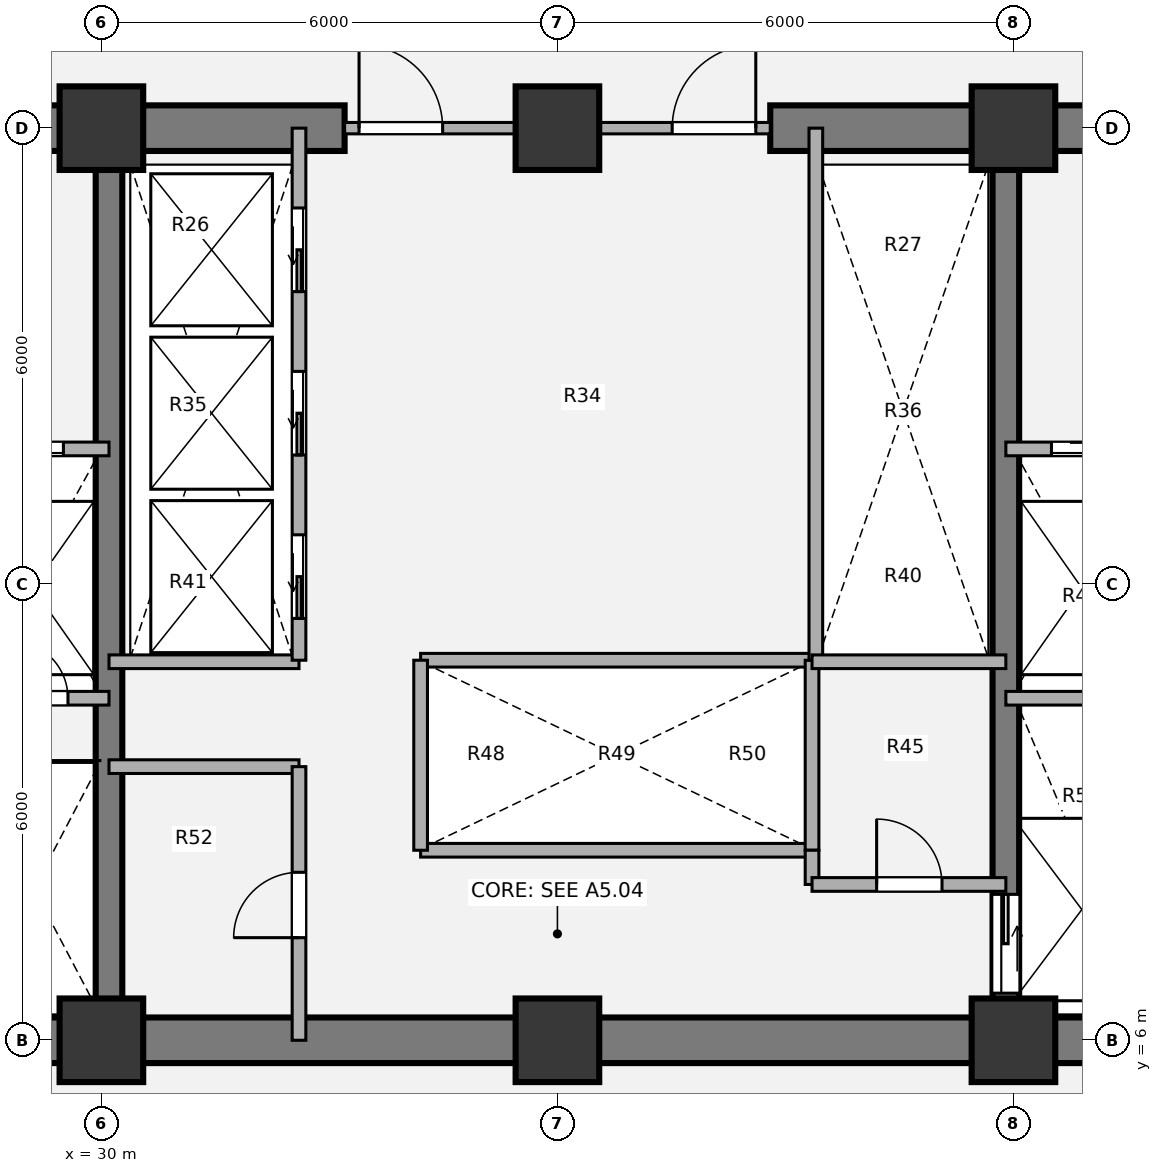
"""IFC4 building model, lengths in metres.
Left out: names, types, materials, properties, quantities, classifications, styles, units other than length and angle.
Written with IfcOpenShell. Run it as: python <this file> out.ifc"""

import sys

from ifc_helpers import new_model, si_unit, direction, frame, frame_2d, origin, origin_2d, place, context, subcontext, project, spatial, rectangle, extrude, source, transform, mapped, element, fill, save


model = new_model("IFC4")
c1 = context("Model", 3, precision=1e-05, world=origin(), true_north=direction((0.0, 1.0)))
c2 = subcontext(c1, "Body", "Model", "MODEL_VIEW")
j1 = project(units=[si_unit("LENGTHUNIT", "METRE"), si_unit("PLANEANGLEUNIT", "RADIAN")], contexts=[c1])
p1 = place(None, origin())
s1 = spatial("IfcSite", under=j1, at=p1, CompositionType="ELEMENT")
p2 = place(p1, origin())
s2 = spatial("IfcBuilding", under=s1, at=p2, CompositionType="ELEMENT")
p3 = place(p2, frame((0.0, 0.0, 34.56)))
s3 = spatial("IfcBuildingStorey", under=s2, at=p3, CompositionType="ELEMENT", Elevation=34.56)
m1 = source(origin(), c2, "Body", "SweptSolid", [
    extrude(rectangle(XDim=1.1, YDim=1.1, at=origin_2d()), origin(), (0.0, 0.0, 1.0), 3.78),
])
for number, where, z_axis, x_axis in (
    (1, (30.0, 6.0, 0.0), (0.0, 0.0, 1.0), (1.0, 0.0, 0.0)),
    (2, (36.0, 6.0, 0.0), (0.0, 0.0, 1.0), (1.0, 0.0, 0.0)),
    (3, (42.0, 6.0, 0.0), (0.0, 0.0, 1.0), (1.0, 0.0, 0.0)),
    (4, (30.0, 18.0, 0.0), (0.0, 0.0, 1.0), (1.0, 0.0, 0.0)),
    (5, (36.0, 18.0, 0.0), (0.0, 0.0, 1.0), (1.0, 0.0, 0.0)),
    (6, (42.0, 18.0, 0.0), (0.0, 0.0, 1.0), (1.0, 0.0, 0.0)),
):
    element("IfcColumn", number, at=place(p3, frame(where, z_axis=z_axis, x_axis=x_axis)), inside=s3, PredefinedType="COLUMN", context=c2, shape_type="MappedRepresentation", body=[
        mapped(m1, transform((0.0, 0.0, 0.0), x_axis=(1.0, 0.0, 0.0), y_axis=(0.0, 1.0, 0.0), z_axis=(0.0, 0.0, 1.0), scale=1.0)),
    ])
p4 = place(p3, frame((48.3, 6.0, 0.0), z_axis=(0.0, 0.0, 1.0), x_axis=(-1.0, 0.0, 0.0)))
e7 = element("IfcWall", 7, at=p4, inside=s3, PredefinedType="SHEAR", context=c2, shape_type="SweptSolid", body=[
    extrude(rectangle(XDim=24.6, YDim=0.6, at=frame_2d((12.3, 0.0))), origin(), (0.0, 0.0, 1.0), 3.78),
])
p5 = place(p3, frame((23.7, 18.0, 0.0), z_axis=(0.0, 0.0, 1.0), x_axis=(1.0, 0.0, 0.0)))
e8 = element("IfcWall", 8, at=p5, inside=s3, PredefinedType="SHEAR", context=c2, shape_type="SweptSolid", body=[
    extrude(rectangle(XDim=9.5, YDim=0.6, at=frame_2d((4.75, 0.0))), origin(), (0.0, 0.0, 1.0), 3.78),
])
p6 = place(p5, frame((2.95, 0.0, 0.0)))
e9 = element("IfcOpeningElement", 9, at=p6, cuts=e8, PredefinedType="OPENING", context=c2, shape_type="SweptSolid", body=[
    extrude(rectangle(XDim=1.1, YDim=2.1, at=origin_2d()), frame((0.55, 0.31, 1.05), z_axis=(0.0, -1.0, 0.0), x_axis=(1.0, 0.0, 0.0)), (0.0, 0.0, 1.0), 0.62),
])
p7 = place(p3, frame((38.8, 18.0, 0.0), z_axis=(0.0, 0.0, 1.0), x_axis=(1.0, 0.0, 0.0)))
e10 = element("IfcWall", 10, at=p7, inside=s3, PredefinedType="SHEAR", context=c2, shape_type="SweptSolid", body=[
    extrude(rectangle(XDim=9.5, YDim=0.6, at=frame_2d((4.75, 0.0))), origin(), (0.0, 0.0, 1.0), 3.78),
])
p8 = place(p7, frame((5.45, 0.0, 0.0)))
e11 = element("IfcOpeningElement", 11, at=p8, cuts=e10, PredefinedType="OPENING", context=c2, shape_type="SweptSolid", body=[
    extrude(rectangle(XDim=1.1, YDim=2.1, at=origin_2d()), frame((0.55, 0.31, 1.05), z_axis=(0.0, -1.0, 0.0), x_axis=(1.0, 0.0, 0.0)), (0.0, 0.0, 1.0), 0.62),
])
p9 = place(p3, frame((30.1, 6.0, 0.0), z_axis=(0.0, 0.0, 1.0), x_axis=(0.0, 1.0, 0.0)))
e12 = element("IfcWall", 12, at=p9, inside=s3, PredefinedType="SHEAR", context=c2, shape_type="SweptSolid", body=[
    extrude(rectangle(XDim=12.0, YDim=0.35, at=frame_2d((6.0, 0.0))), origin(), (0.0, 0.0, 1.0), 3.78),
])
p10 = place(p3, frame((41.9, 18.0, 0.0), z_axis=(0.0, 0.0, 1.0), x_axis=(0.0, -1.0, 0.0)))
e13 = element("IfcWall", 13, at=p10, inside=s3, PredefinedType="SHEAR", context=c2, shape_type="SweptSolid", body=[
    extrude(rectangle(XDim=12.0, YDim=0.35, at=frame_2d((6.0, 0.0))), origin(), (0.0, 0.0, 1.0), 3.78),
])
p11 = place(p10, frame((10.08, 0.0, 0.0)))
e14 = element("IfcOpeningElement", 14, at=p11, cuts=e13, PredefinedType="OPENING", context=c2, shape_type="SweptSolid", body=[
    extrude(rectangle(XDim=1.3, YDim=2.1, at=origin_2d()), frame((0.65, 0.185, 1.05), z_axis=(0.0, -1.0, 0.0), x_axis=(1.0, 0.0, 0.0)), (0.0, 0.0, 1.0), 0.37),
])
for number, where, z_axis, x_axis in (
    (15, (34.2, 11.0, 0.0), (0.0, 0.0, 1.0), (1.0, 0.0, 0.0)),
    (16, (34.2, 8.5, 0.0), (0.0, 0.0, 1.0), (1.0, 0.0, 0.0)),
):
    element("IfcWall", number, at=place(p3, frame(where, z_axis=z_axis, x_axis=x_axis)), inside=s3, PredefinedType="PARTITIONING", context=c2, shape_type="SweptSolid", body=[
        extrude(rectangle(XDim=5.15, YDim=0.18, at=frame_2d((2.575, 0.0))), origin(), (0.0, 0.0, 1.0), 3.5),
    ])
for number, where, z_axis, x_axis in (
    (17, (34.2, 8.5, 0.0), (0.0, 0.0, 1.0), (0.0, 1.0, 0.0)),
    (18, (39.35, 8.5, 0.0), (0.0, 0.0, 1.0), (0.0, 1.0, 0.0)),
):
    element("IfcWall", number, at=place(p3, frame(where, z_axis=z_axis, x_axis=x_axis)), inside=s3, PredefinedType="PARTITIONING", context=c2, shape_type="SweptSolid", body=[
        extrude(rectangle(XDim=2.5, YDim=0.18, at=frame_2d((1.25, 0.0))), origin(), (0.0, 0.0, 1.0), 3.5),
    ])
p12 = place(p3, frame((39.4, 11.0, 0.0), z_axis=(0.0, 0.0, 1.0), x_axis=(0.0, 1.0, 0.0)))
e19 = element("IfcWall", 19, at=p12, inside=s3, PredefinedType="PARTITIONING", context=c2, shape_type="SweptSolid", body=[
    extrude(rectangle(XDim=7.0, YDim=0.18, at=frame_2d((3.5, 0.0))), origin(), (0.0, 0.0, 1.0), 3.5),
])
for number, where, z_axis, x_axis in (
    (20, (30.1, 10.98, 0.0), (0.0, 0.0, 1.0), (1.0, 0.0, 0.0)),
    (21, (30.1, 9.6, 0.0), (0.0, 0.0, 1.0), (1.0, 0.0, 0.0)),
):
    element("IfcWall", number, at=place(p3, frame(where, z_axis=z_axis, x_axis=x_axis)), inside=s3, PredefinedType="PARTITIONING", context=c2, shape_type="SweptSolid", body=[
        extrude(rectangle(XDim=2.5, YDim=0.18, at=frame_2d((1.25, 0.0))), origin(), (0.0, 0.0, 1.0), 3.5),
    ])
p13 = place(p3, frame((32.6, 6.0, 0.0), z_axis=(0.0, 0.0, 1.0), x_axis=(0.0, 1.0, 0.0)))
e22 = element("IfcWall", 22, at=p13, inside=s3, PredefinedType="PARTITIONING", context=c2, shape_type="SweptSolid", body=[
    extrude(rectangle(XDim=3.6, YDim=0.18, at=frame_2d((1.8, 0.0))), origin(), (0.0, 0.0, 1.0), 3.5),
])
p14 = place(p13, frame((1.35, 0.0, 0.0)))
e23 = element("IfcOpeningElement", 23, at=p14, cuts=e22, PredefinedType="OPENING", context=c2, shape_type="SweptSolid", body=[
    extrude(rectangle(XDim=0.86, YDim=2.1, at=origin_2d()), frame((0.43, 0.1, 1.05), z_axis=(0.0, -1.0, 0.0), x_axis=(1.0, 0.0, 0.0)), (0.0, 0.0, 1.0), 0.2),
])
p15 = place(p3, frame((39.35, 10.98, 0.0), z_axis=(0.0, 0.0, 1.0), x_axis=(1.0, 0.0, 0.0)))
e24 = element("IfcWall", 24, at=p15, inside=s3, PredefinedType="PARTITIONING", context=c2, shape_type="SweptSolid", body=[
    extrude(rectangle(XDim=2.55, YDim=0.18, at=frame_2d((1.275, 0.0))), origin(), (0.0, 0.0, 1.0), 3.5),
])
p16 = place(p3, frame((39.35, 8.05, 0.0), z_axis=(0.0, 0.0, 1.0), x_axis=(0.0, 1.0, 0.0)))
e25 = element("IfcWall", 25, at=p16, inside=s3, PredefinedType="PARTITIONING", context=c2, shape_type="SweptSolid", body=[
    extrude(rectangle(XDim=0.45, YDim=0.18, at=frame_2d((0.225, 0.0))), origin(), (0.0, 0.0, 1.0), 3.5),
])
p17 = place(p3, frame((39.35, 8.05, 0.0), z_axis=(0.0, 0.0, 1.0), x_axis=(1.0, 0.0, 0.0)))
e26 = element("IfcWall", 26, at=p17, inside=s3, PredefinedType="PARTITIONING", context=c2, shape_type="SweptSolid", body=[
    extrude(rectangle(XDim=2.55, YDim=0.18, at=frame_2d((1.275, 0.0))), origin(), (0.0, 0.0, 1.0), 3.5),
])
p18 = place(p17, frame((0.85, 0.0, 0.0)))
e27 = element("IfcOpeningElement", 27, at=p18, cuts=e26, PredefinedType="OPENING", context=c2, shape_type="SweptSolid", body=[
    extrude(rectangle(XDim=0.86, YDim=2.1, at=origin_2d()), frame((0.43, 0.1, 1.05), z_axis=(0.0, -1.0, 0.0), x_axis=(1.0, 0.0, 0.0)), (0.0, 0.0, 1.0), 0.2),
])
p19 = place(p3, frame((33.2, 18.0, 0.0), z_axis=(0.0, 0.0, 1.0), x_axis=(1.0, 0.0, 0.0)))
e28 = element("IfcWall", 28, at=p19, inside=s3, PredefinedType="PARTITIONING", context=c2, shape_type="SweptSolid", body=[
    extrude(rectangle(XDim=5.6, YDim=0.15, at=frame_2d((2.8, 0.0))), origin(), (0.0, 0.0, 1.0), 2.315),
])
p20 = place(p19, frame((0.19, 0.0, 0.0)))
e29 = element("IfcOpeningElement", 29, at=p20, cuts=e28, PredefinedType="OPENING", context=c2, shape_type="SweptSolid", body=[
    extrude(rectangle(XDim=1.1, YDim=2.1, at=origin_2d()), frame((0.55, 0.085, 1.05), z_axis=(0.0, -1.0, 0.0), x_axis=(1.0, 0.0, 0.0)), (0.0, 0.0, 1.0), 0.17),
])
p21 = place(p19, frame((4.31, 0.0, 0.0)))
e30 = element("IfcOpeningElement", 30, at=p21, cuts=e28, PredefinedType="OPENING", context=c2, shape_type="SweptSolid", body=[
    extrude(rectangle(XDim=1.1, YDim=2.1, at=origin_2d()), frame((0.55, 0.085, 1.05), z_axis=(0.0, -1.0, 0.0), x_axis=(1.0, 0.0, 0.0)), (0.0, 0.0, 1.0), 0.17),
])
p22 = place(p3, frame((24.0, 13.78, 0.0), z_axis=(0.0, 0.0, 1.0), x_axis=(1.0, 0.0, 0.0)))
e31 = element("IfcWall", 31, at=p22, inside=s3, PredefinedType="PARTITIONING", context=c2, shape_type="SweptSolid", body=[
    extrude(rectangle(XDim=6.1, YDim=0.18, at=frame_2d((3.05, 0.0))), origin(), (0.0, 0.0, 1.0), 3.5),
])
p23 = place(p22, frame((1.15, 0.0, 0.0)))
e32 = element("IfcOpeningElement", 32, at=p23, cuts=e31, PredefinedType="OPENING", context=c2, shape_type="SweptSolid", body=[
    extrude(rectangle(XDim=1.1, YDim=2.1, at=origin_2d()), frame((0.55, 0.1, 1.05), z_axis=(0.0, -1.0, 0.0), x_axis=(1.0, 0.0, 0.0)), (0.0, 0.0, 1.0), 0.2),
])
p24 = place(p22, frame((4.4, 0.0, 0.0)))
e33 = element("IfcOpeningElement", 33, at=p24, cuts=e31, PredefinedType="OPENING", context=c2, shape_type="SweptSolid", body=[
    extrude(rectangle(XDim=1.1, YDim=2.1, at=origin_2d()), frame((0.55, 0.1, 1.05), z_axis=(0.0, -1.0, 0.0), x_axis=(1.0, 0.0, 0.0)), (0.0, 0.0, 1.0), 0.2),
])
p25 = place(p3, frame((28.15, 10.5, 0.0), z_axis=(0.0, 0.0, 1.0), x_axis=(1.0, 0.0, 0.0)))
e34 = element("IfcWall", 34, at=p25, inside=s3, PredefinedType="PARTITIONING", context=c2, shape_type="SweptSolid", body=[
    extrude(rectangle(XDim=1.95, YDim=0.18, at=frame_2d((0.975, 0.0))), origin(), (0.0, 0.0, 1.0), 3.5),
])
p26 = place(p25, frame((0.65, 0.0, 0.0)))
e35 = element("IfcOpeningElement", 35, at=p26, cuts=e34, PredefinedType="OPENING", context=c2, shape_type="SweptSolid", body=[
    extrude(rectangle(XDim=0.76, YDim=2.05, at=origin_2d()), frame((0.38, 0.1, 1.025), z_axis=(0.0, -1.0, 0.0), x_axis=(1.0, 0.0, 0.0)), (0.0, 0.0, 1.0), 0.2),
])
p27 = place(p3, frame((41.9, 13.78, 0.0), z_axis=(0.0, 0.0, 1.0), x_axis=(1.0, 0.0, 0.0)))
e36 = element("IfcWall", 36, at=p27, inside=s3, PredefinedType="PARTITIONING", context=c2, shape_type="SweptSolid", body=[
    extrude(rectangle(XDim=6.1, YDim=0.18, at=frame_2d((3.05, 0.0))), origin(), (0.0, 0.0, 1.0), 3.5),
])
p28 = place(p27, frame((0.6, 0.0, 0.0)))
e37 = element("IfcOpeningElement", 37, at=p28, cuts=e36, PredefinedType="OPENING", context=c2, shape_type="SweptSolid", body=[
    extrude(rectangle(XDim=1.1, YDim=2.1, at=origin_2d()), frame((0.55, 0.1, 1.05), z_axis=(0.0, -1.0, 0.0), x_axis=(1.0, 0.0, 0.0)), (0.0, 0.0, 1.0), 0.2),
])
p29 = place(p27, frame((3.8, 0.0, 0.0)))
e38 = element("IfcOpeningElement", 38, at=p29, cuts=e36, PredefinedType="OPENING", context=c2, shape_type="SweptSolid", body=[
    extrude(rectangle(XDim=1.1, YDim=2.1, at=origin_2d()), frame((0.55, 0.1, 1.05), z_axis=(0.0, -1.0, 0.0), x_axis=(1.0, 0.0, 0.0)), (0.0, 0.0, 1.0), 0.2),
])
p30 = place(p3, frame((41.9, 10.5, 0.0), z_axis=(0.0, 0.0, 1.0), x_axis=(1.0, 0.0, 0.0)))
e39 = element("IfcWall", 39, at=p30, inside=s3, PredefinedType="PARTITIONING", context=c2, shape_type="SweptSolid", body=[
    extrude(rectangle(XDim=1.95, YDim=0.18, at=frame_2d((0.975, 0.0))), origin(), (0.0, 0.0, 1.0), 3.5),
])
p31 = place(p3, frame((32.6, 11.0, 0.0), z_axis=(0.0, 0.0, 1.0), x_axis=(0.0, 1.0, 0.0)))
e40 = element("IfcWall", 40, at=p31, inside=s3, PredefinedType="PARTITIONING", context=c2, shape_type="SweptSolid", body=[
    extrude(rectangle(XDim=7.0, YDim=0.18, at=frame_2d((3.5, 0.0))), origin(), (0.0, 0.0, 1.0), 3.5),
])
p32 = place(p31, frame((0.55, 0.0, 0.0)))
e41 = element("IfcOpeningElement", 41, at=p32, cuts=e40, PredefinedType="OPENING", context=c2, shape_type="SweptSolid", body=[
    extrude(rectangle(XDim=1.1, YDim=2.1, at=origin_2d()), frame((0.55, 0.1, 1.05), z_axis=(0.0, -1.0, 0.0), x_axis=(1.0, 0.0, 0.0)), (0.0, 0.0, 1.0), 0.2),
])
p33 = place(p31, frame((2.7, 0.0, 0.0)))
e42 = element("IfcOpeningElement", 42, at=p33, cuts=e40, PredefinedType="OPENING", context=c2, shape_type="SweptSolid", body=[
    extrude(rectangle(XDim=1.1, YDim=2.1, at=origin_2d()), frame((0.55, 0.1, 1.05), z_axis=(0.0, -1.0, 0.0), x_axis=(1.0, 0.0, 0.0)), (0.0, 0.0, 1.0), 0.2),
])
p34 = place(p31, frame((4.85, 0.0, 0.0)))
e43 = element("IfcOpeningElement", 43, at=p34, cuts=e40, PredefinedType="OPENING", context=c2, shape_type="SweptSolid", body=[
    extrude(rectangle(XDim=1.1, YDim=2.1, at=origin_2d()), frame((0.55, 0.1, 1.05), z_axis=(0.0, -1.0, 0.0), x_axis=(1.0, 0.0, 0.0)), (0.0, 0.0, 1.0), 0.2),
])
m2 = source(origin(), c2, "Body", "SweptSolid", [
    extrude(rectangle(XDim=0.86, YDim=2.1, at=origin_2d()), frame((0.43, 0.025, 1.05), z_axis=(0.0, -1.0, 0.0), x_axis=(1.0, 0.0, 0.0)), (0.0, 0.0, 1.0), 0.05),
])
p35 = place(p14, origin())
e44 = element("IfcDoor", 44, at=p35, inside=s3, OperationType="SINGLE_SWING_LEFT", PredefinedType="DOOR", context=c2, shape_type="MappedRepresentation", body=[
    mapped(m2, transform((0.0, 0.0, 0.0), x_axis=(1.0, 0.0, 0.0), y_axis=(0.0, 1.0, 0.0), z_axis=(0.0, 0.0, 1.0), scale=1.0)),
])
fill(e23, e44)
p36 = place(p18, origin())
e45 = element("IfcDoor", 45, at=p36, inside=s3, OperationType="SINGLE_SWING_LEFT", PredefinedType="DOOR", context=c2, shape_type="MappedRepresentation", body=[
    mapped(m2, transform((0.0, 0.0, 0.0), x_axis=(1.0, 0.0, 0.0), y_axis=(0.0, 1.0, 0.0), z_axis=(0.0, 0.0, 1.0), scale=1.0)),
])
fill(e27, e45)
m3 = source(origin(), c2, "Body", "SweptSolid", [
    extrude(rectangle(XDim=1.1, YDim=2.1, at=origin_2d()), frame((0.55, 0.025, 1.05), z_axis=(0.0, -1.0, 0.0), x_axis=(1.0, 0.0, 0.0)), (0.0, 0.0, 1.0), 0.05),
])
p37 = place(p20, origin())
e46 = element("IfcDoor", 46, at=p37, inside=s3, OperationType="SINGLE_SWING_LEFT", PredefinedType="DOOR", context=c2, shape_type="MappedRepresentation", body=[
    mapped(m3, transform((0.0, 0.0, 0.0), x_axis=(1.0, 0.0, 0.0), y_axis=(0.0, 1.0, 0.0), z_axis=(0.0, 0.0, 1.0), scale=1.0)),
])
fill(e29, e46)
p38 = place(p21, origin())
e47 = element("IfcDoor", 47, at=p38, inside=s3, OperationType="SINGLE_SWING_RIGHT", PredefinedType="DOOR", context=c2, shape_type="MappedRepresentation", body=[
    mapped(m3, transform((0.0, 0.0, 0.0), x_axis=(1.0, 0.0, 0.0), y_axis=(0.0, 1.0, 0.0), z_axis=(0.0, 0.0, 1.0), scale=1.0)),
])
fill(e30, e47)
m4 = source(origin(), c2, "Body", "SweptSolid", [
    extrude(rectangle(XDim=1.1, YDim=2.1, at=origin_2d()), frame((0.55, 0.025, 1.05), z_axis=(0.0, -1.0, 0.0), x_axis=(1.0, 0.0, 0.0)), (0.0, 0.0, 1.0), 0.05),
])
p39 = place(p24, origin())
e48 = element("IfcDoor", 48, at=p39, inside=s3, OperationType="SLIDING_TO_LEFT", PredefinedType="DOOR", context=c2, shape_type="MappedRepresentation", body=[
    mapped(m4, transform((0.0, 0.0, 0.0), x_axis=(1.0, 0.0, 0.0), y_axis=(0.0, 1.0, 0.0), z_axis=(0.0, 0.0, 1.0), scale=1.0)),
])
fill(e33, e48)
m5 = source(origin(), c2, "Body", "SweptSolid", [
    extrude(rectangle(XDim=0.76, YDim=2.05, at=origin_2d()), frame((0.38, 0.025, 1.025), z_axis=(0.0, -1.0, 0.0), x_axis=(1.0, 0.0, 0.0)), (0.0, 0.0, 1.0), 0.05),
])
p40 = place(p26, origin())
e49 = element("IfcDoor", 49, at=p40, inside=s3, OperationType="SINGLE_SWING_LEFT", PredefinedType="DOOR", context=c2, shape_type="MappedRepresentation", body=[
    mapped(m5, transform((0.0, 0.0, 0.0), x_axis=(1.0, 0.0, 0.0), y_axis=(0.0, 1.0, 0.0), z_axis=(0.0, 0.0, 1.0), scale=1.0)),
])
fill(e35, e49)
p41 = place(p28, origin())
e50 = element("IfcDoor", 50, at=p41, inside=s3, OperationType="SLIDING_TO_RIGHT", PredefinedType="DOOR", context=c2, shape_type="MappedRepresentation", body=[
    mapped(m4, transform((0.0, 0.0, 0.0), x_axis=(1.0, 0.0, 0.0), y_axis=(0.0, 1.0, 0.0), z_axis=(0.0, 0.0, 1.0), scale=1.0)),
])
fill(e37, e50)
m6 = source(origin(), c2, "Body", "SweptSolid", [
    extrude(rectangle(XDim=1.3, YDim=2.1, at=origin_2d()), frame((0.65, 0.025, 1.05), z_axis=(0.0, -1.0, 0.0), x_axis=(1.0, 0.0, 0.0)), (0.0, 0.0, 1.0), 0.05),
])
p42 = place(p11, origin())
e51 = element("IfcDoor", 51, at=p42, inside=s3, OperationType="SLIDING_TO_LEFT", PredefinedType="DOOR", context=c2, shape_type="MappedRepresentation", body=[
    mapped(m6, transform((0.0, 0.0, 0.0), x_axis=(1.0, 0.0, 0.0), y_axis=(0.0, 1.0, 0.0), z_axis=(0.0, 0.0, 1.0), scale=1.0)),
])
fill(e14, e51)
p43 = place(p32, origin())
e52 = element("IfcDoor", 52, at=p43, inside=s3, OperationType="SLIDING_TO_LEFT", PredefinedType="DOOR", context=c2, shape_type="MappedRepresentation", body=[
    mapped(m4, transform((0.0, 0.0, 0.0), x_axis=(1.0, 0.0, 0.0), y_axis=(0.0, 1.0, 0.0), z_axis=(0.0, 0.0, 1.0), scale=1.0)),
])
fill(e41, e52)
p44 = place(p33, origin())
e53 = element("IfcDoor", 53, at=p44, inside=s3, OperationType="SLIDING_TO_LEFT", PredefinedType="DOOR", context=c2, shape_type="MappedRepresentation", body=[
    mapped(m4, transform((0.0, 0.0, 0.0), x_axis=(1.0, 0.0, 0.0), y_axis=(0.0, 1.0, 0.0), z_axis=(0.0, 0.0, 1.0), scale=1.0)),
])
fill(e42, e53)
p45 = place(p34, origin())
e54 = element("IfcDoor", 54, at=p45, inside=s3, OperationType="SLIDING_TO_LEFT", PredefinedType="DOOR", context=c2, shape_type="MappedRepresentation", body=[
    mapped(m4, transform((0.0, 0.0, 0.0), x_axis=(1.0, 0.0, 0.0), y_axis=(0.0, 1.0, 0.0), z_axis=(0.0, 0.0, 1.0), scale=1.0)),
])
fill(e43, e54)
save(model, sys.argv[1])
